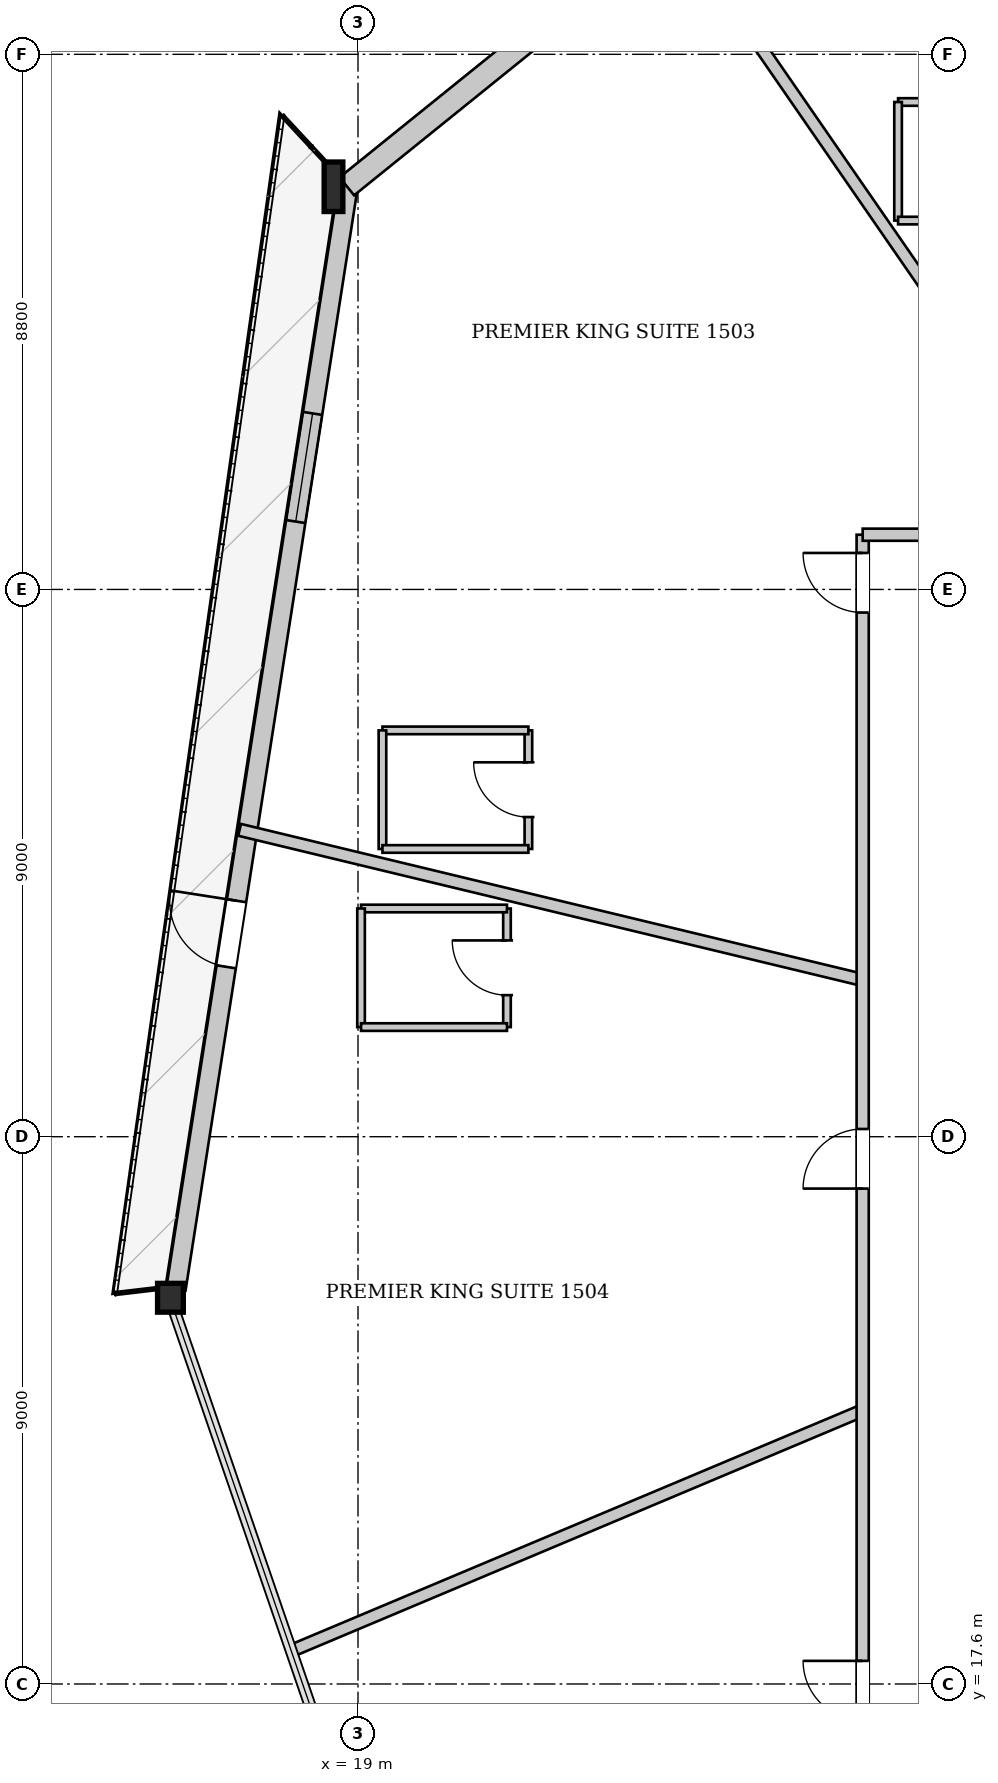
"""IFC4 building model, lengths in metres.
Left out: names, types, materials, properties, quantities, classifications, styles, units other than length and angle.
Written with IfcOpenShell. Run it as: python <this file> out.ifc"""

import sys

from ifc_helpers import new_model, si_unit, direction, frame, frame_2d, origin, origin_2d, place, context, subcontext, project, spatial, rectangle, i_section, extrude, source, transform, mapped, element, fill, save


model = new_model("IFC4")
c1 = context("Model", 3, precision=1e-05, world=origin(), true_north=direction((0.0, 1.0)))
c2 = subcontext(c1, "Body", "Model", "MODEL_VIEW")
j1 = project(units=[si_unit("LENGTHUNIT", "METRE"), si_unit("PLANEANGLEUNIT", "RADIAN")], contexts=[c1])
p1 = place(None, origin())
s1 = spatial("IfcSite", under=j1, at=p1, CompositionType="ELEMENT")
p2 = place(p1, origin())
s2 = spatial("IfcBuilding", under=s1, at=p2, CompositionType="ELEMENT")
p3 = place(p2, frame((0.0, 0.0, 61.25)))
s3 = spatial("IfcBuildingStorey", under=s2, at=p3, CompositionType="ELEMENT", Elevation=61.25)
m1 = source(origin(), c2, "Body", "SweptSolid", [
    extrude(i_section(OverallWidth=0.308, OverallDepth=0.814, WebThickness=0.021, FlangeThickness=0.04, at=origin_2d()), origin(), (0.0, 0.0, 1.0), 3.405),
])
p4 = place(p3, frame((18.697, 42.377, 0.0), z_axis=(-0.058937346962, -0.090843818249, 0.994119605389), x_axis=(0.838912262551, -0.544266677045, 0.0)))
e1 = element("IfcColumn", 1, at=p4, inside=s3, PredefinedType="COLUMN", context=c2, shape_type="MappedRepresentation", body=[
    mapped(m1, transform((0.0, 0.0, 0.0), x_axis=(1.0, 0.0, 0.0), y_axis=(0.0, 1.0, 0.0), z_axis=(0.0, 0.0, 1.0), scale=1.0)),
])
m2 = source(origin(), c2, "Body", "SweptSolid", [
    extrude(i_section(OverallWidth=0.424, OverallDepth=0.474, WebThickness=0.043, FlangeThickness=0.068, at=origin_2d()), origin(), (0.0, 0.0, 1.0), 3.404),
])
p5 = place(p3, frame((15.847, 24.12, 0.0), z_axis=(0.039800759955, -0.0988923387, 0.994301868073), x_axis=(0.92768588672, 0.373361615033, 0.0)))
e2 = element("IfcColumn", 2, at=p5, inside=s3, PredefinedType="COLUMN", context=c2, shape_type="MappedRepresentation", body=[
    mapped(m2, transform((0.0, 0.0, 0.0), x_axis=(1.0, 0.0, 0.0), y_axis=(0.0, 1.0, 0.0), z_axis=(0.0, 0.0, 1.0), scale=1.0)),
])
p6 = place(p3, frame((16.006, 24.095, 0.0), z_axis=(0.0, 0.0, 1.0), x_axis=(0.154230167558, 0.988034946454, 0.0)))
e3 = element("IfcWall", 3, at=p6, inside=s3, PredefinedType="SOLIDWALL", context=c2, shape_type="SweptSolid", body=[
    extrude(rectangle(XDim=18.478, YDim=0.32, at=frame_2d((9.239, 0.0))), origin(), (0.0, 0.0, 1.0), 2.592),
])
p7 = place(p6, frame((5.363, 0.0, 0.0)))
e4 = element("IfcOpeningElement", 4, at=p7, cuts=e3, PredefinedType="OPENING", context=c2, shape_type="SweptSolid", body=[
    extrude(rectangle(XDim=1.1, YDim=2.3, at=frame_2d((0.55, 1.15))), frame((0.0, 0.17, 0.0), z_axis=(0.0, -1.0, 0.0), x_axis=(1.0, 0.0, 0.0)), (0.0, 0.0, 1.0), 0.34),
])
p8 = place(p6, frame((12.774, 0.0, 0.272)))
e5 = element("IfcOpeningElement", 5, at=p8, cuts=e3, PredefinedType="OPENING", context=c2, shape_type="SweptSolid", body=[
    extrude(rectangle(XDim=1.8, YDim=2.2, at=frame_2d((0.9, 1.1))), frame((0.0, 0.17, 0.0), z_axis=(0.0, -1.0, 0.0), x_axis=(1.0, 0.0, 0.0)), (0.0, 0.0, 1.0), 0.34),
])
p9 = place(p3, frame((18.817, 42.229, 0.0), z_axis=(0.0, 0.0, 1.0), x_axis=(0.778217687349, 0.627994610722, 0.0)))
e6 = element("IfcWall", 6, at=p9, inside=s3, PredefinedType="SOLIDWALL", context=c2, shape_type="SweptSolid", body=[
    extrude(rectangle(XDim=6.207, YDim=0.38, at=frame_2d((3.103, 0.0))), origin(), (0.0, 0.0, 1.0), 2.592),
])
p10 = place(p3, frame((31.161, 36.5, 0.0), z_axis=(0.0, 0.0, 1.0), x_axis=(-0.568362835672, 0.822778030229, 0.0)))
e7 = element("IfcWall", 7, at=p10, inside=s3, PredefinedType="PARTITIONING", context=c2, shape_type="SweptSolid", body=[
    extrude(rectangle(XDim=11.708, YDim=0.2, at=frame_2d((5.854, 0.0))), origin(), (0.0, 0.0, 1.0), 3.3),
])
p11 = place(p3, frame((27.3, 29.178, 0.0), z_axis=(0.0, 0.0, 1.0), x_axis=(-0.972184679764, 0.234215602453, 0.0)))
e8 = element("IfcWall", 8, at=p11, inside=s3, PredefinedType="PARTITIONING", context=c2, shape_type="SweptSolid", body=[
    extrude(rectangle(XDim=10.541, YDim=0.2, at=frame_2d((5.27, 0.0))), origin(), (0.0, 0.0, 1.0), 3.3),
])
p12 = place(p3, frame((27.3, 22.098, 0.0), z_axis=(0.0, 0.0, 1.0), x_axis=(-0.921738414134, -0.387812191543, 0.0)))
e9 = element("IfcWall", 9, at=p12, inside=s3, PredefinedType="PARTITIONING", context=c2, shape_type="SweptSolid", body=[
    extrude(rectangle(XDim=10.166, YDim=0.2, at=frame_2d((5.083, 0.0))), origin(), (0.0, 0.0, 1.0), 3.3),
])
p13 = place(p3, frame((30.282, 43.616, 0.0), z_axis=(0.0, 0.0, 1.0), x_axis=(-1.0, 0.0, 0.0)))
e10 = element("IfcWall", 10, at=p13, inside=s3, PredefinedType="PARTITIONING", context=c2, shape_type="SweptSolid", body=[
    extrude(rectangle(XDim=2.4, YDim=0.125, at=frame_2d((1.2, 0.0))), origin(), (0.0, 0.0, 1.0), 3.3),
])
p14 = place(p3, frame((27.882, 43.616, 0.0), z_axis=(0.0, 0.0, 1.0), x_axis=(0.0, -1.0, 0.0)))
e11 = element("IfcWall", 11, at=p14, inside=s3, PredefinedType="PARTITIONING", context=c2, shape_type="SweptSolid", body=[
    extrude(rectangle(XDim=1.95, YDim=0.125, at=frame_2d((0.975, 0.0))), origin(), (0.0, 0.0, 1.0), 3.3),
])
p15 = place(p3, frame((27.882, 41.666, 0.0), z_axis=(0.0, 0.0, 1.0), x_axis=(1.0, 0.0, 0.0)))
e12 = element("IfcWall", 12, at=p15, inside=s3, PredefinedType="PARTITIONING", context=c2, shape_type="SweptSolid", body=[
    extrude(rectangle(XDim=2.4, YDim=0.125, at=frame_2d((1.2, 0.0))), origin(), (0.0, 0.0, 1.0), 3.3),
])
p16 = place(p3, frame((21.802, 31.332, 0.0), z_axis=(0.0, 0.0, 1.0), x_axis=(0.0, 1.0, 0.0)))
e13 = element("IfcWall", 13, at=p16, inside=s3, PredefinedType="PARTITIONING", context=c2, shape_type="SweptSolid", body=[
    extrude(rectangle(XDim=1.95, YDim=0.125, at=frame_2d((0.975, 0.0))), origin(), (0.0, 0.0, 1.0), 3.3),
])
p17 = place(p16, frame((0.525, 0.0, 0.0)))
e14 = element("IfcOpeningElement", 14, at=p17, cuts=e13, PredefinedType="OPENING", context=c2, shape_type="SweptSolid", body=[
    extrude(rectangle(XDim=0.9, YDim=2.1, at=frame_2d((0.45, 1.05))), frame((0.0, 0.073, 0.0), z_axis=(0.0, -1.0, 0.0), x_axis=(1.0, 0.0, 0.0)), (0.0, 0.0, 1.0), 0.145),
])
p18 = place(p3, frame((21.802, 33.282, 0.0), z_axis=(0.0, 0.0, 1.0), x_axis=(-1.0, 0.0, 0.0)))
e15 = element("IfcWall", 15, at=p18, inside=s3, PredefinedType="PARTITIONING", context=c2, shape_type="SweptSolid", body=[
    extrude(rectangle(XDim=2.4, YDim=0.125, at=frame_2d((1.2, 0.0))), origin(), (0.0, 0.0, 1.0), 3.3),
])
p19 = place(p3, frame((19.402, 33.282, 0.0), z_axis=(0.0, 0.0, 1.0), x_axis=(0.0, -1.0, 0.0)))
e16 = element("IfcWall", 16, at=p19, inside=s3, PredefinedType="PARTITIONING", context=c2, shape_type="SweptSolid", body=[
    extrude(rectangle(XDim=1.95, YDim=0.125, at=frame_2d((0.975, 0.0))), origin(), (0.0, 0.0, 1.0), 3.3),
])
p20 = place(p3, frame((19.402, 31.332, 0.0), z_axis=(0.0, 0.0, 1.0), x_axis=(1.0, 0.0, 0.0)))
e17 = element("IfcWall", 17, at=p20, inside=s3, PredefinedType="PARTITIONING", context=c2, shape_type="SweptSolid", body=[
    extrude(rectangle(XDim=2.4, YDim=0.125, at=frame_2d((1.2, 0.0))), origin(), (0.0, 0.0, 1.0), 3.3),
])
p21 = place(p3, frame((21.45, 28.403, 0.0), z_axis=(0.0, 0.0, 1.0), x_axis=(0.0, 1.0, 0.0)))
e18 = element("IfcWall", 18, at=p21, inside=s3, PredefinedType="PARTITIONING", context=c2, shape_type="SweptSolid", body=[
    extrude(rectangle(XDim=1.95, YDim=0.125, at=frame_2d((0.975, 0.0))), origin(), (0.0, 0.0, 1.0), 3.3),
])
p22 = place(p21, frame((0.525, 0.0, 0.0)))
e19 = element("IfcOpeningElement", 19, at=p22, cuts=e18, PredefinedType="OPENING", context=c2, shape_type="SweptSolid", body=[
    extrude(rectangle(XDim=0.9, YDim=2.1, at=frame_2d((0.45, 1.05))), frame((0.0, 0.073, 0.0), z_axis=(0.0, -1.0, 0.0), x_axis=(1.0, 0.0, 0.0)), (0.0, 0.0, 1.0), 0.145),
])
p23 = place(p3, frame((21.45, 30.353, 0.0), z_axis=(0.0, 0.0, 1.0), x_axis=(-1.0, 0.0, 0.0)))
e20 = element("IfcWall", 20, at=p23, inside=s3, PredefinedType="PARTITIONING", context=c2, shape_type="SweptSolid", body=[
    extrude(rectangle(XDim=2.4, YDim=0.125, at=frame_2d((1.2, 0.0))), origin(), (0.0, 0.0, 1.0), 3.3),
])
p24 = place(p3, frame((19.05, 30.353, 0.0), z_axis=(0.0, 0.0, 1.0), x_axis=(0.0, -1.0, 0.0)))
e21 = element("IfcWall", 21, at=p24, inside=s3, PredefinedType="PARTITIONING", context=c2, shape_type="SweptSolid", body=[
    extrude(rectangle(XDim=1.95, YDim=0.125, at=frame_2d((0.975, 0.0))), origin(), (0.0, 0.0, 1.0), 3.3),
])
p25 = place(p3, frame((19.05, 28.403, 0.0), z_axis=(0.0, 0.0, 1.0), x_axis=(1.0, 0.0, 0.0)))
e22 = element("IfcWall", 22, at=p25, inside=s3, PredefinedType="PARTITIONING", context=c2, shape_type="SweptSolid", body=[
    extrude(rectangle(XDim=2.4, YDim=0.125, at=frame_2d((1.2, 0.0))), origin(), (0.0, 0.0, 1.0), 3.3),
])
p26 = place(p3, frame((27.3, 16.7, 0.0), z_axis=(0.0, 0.0, 1.0), x_axis=(0.0, 1.0, 0.0)))
e23 = element("IfcWall", 23, at=p26, inside=s3, PredefinedType="PARTITIONING", context=c2, shape_type="SweptSolid", body=[
    extrude(rectangle(XDim=19.8, YDim=0.2, at=frame_2d((9.9, 0.0))), origin(), (0.0, 0.0, 1.0), 3.3),
])
p27 = place(p26, frame((18.52, 0.0, 0.0)))
e24 = element("IfcOpeningElement", 24, at=p27, cuts=e23, PredefinedType="OPENING", context=c2, shape_type="SweptSolid", body=[
    extrude(rectangle(XDim=0.98, YDim=2.15, at=frame_2d((0.49, 1.075))), frame((0.0, 0.11, 0.0), z_axis=(0.0, -1.0, 0.0), x_axis=(1.0, 0.0, 0.0)), (0.0, 0.0, 1.0), 0.22),
])
p28 = place(p26, frame((9.047, 0.0, 0.0)))
e25 = element("IfcOpeningElement", 25, at=p28, cuts=e23, PredefinedType="OPENING", context=c2, shape_type="SweptSolid", body=[
    extrude(rectangle(XDim=0.98, YDim=2.15, at=frame_2d((0.49, 1.075))), frame((0.0, 0.11, 0.0), z_axis=(0.0, -1.0, 0.0), x_axis=(1.0, 0.0, 0.0)), (0.0, 0.0, 1.0), 0.22),
])
p29 = place(p26, frame((0.3, 0.0, 0.0)))
e26 = element("IfcOpeningElement", 26, at=p29, cuts=e23, PredefinedType="OPENING", context=c2, shape_type="SweptSolid", body=[
    extrude(rectangle(XDim=0.98, YDim=2.15, at=frame_2d((0.49, 1.075))), frame((0.0, 0.11, 0.0), z_axis=(0.0, -1.0, 0.0), x_axis=(1.0, 0.0, 0.0)), (0.0, 0.0, 1.0), 0.22),
])
p30 = place(p3, frame((27.3, 36.5, 0.0), z_axis=(0.0, 0.0, 1.0), x_axis=(1.0, 0.0, 0.0)))
e27 = element("IfcWall", 27, at=p30, inside=s3, PredefinedType="PARTITIONING", context=c2, shape_type="SweptSolid", body=[
    extrude(rectangle(XDim=21.4, YDim=0.2, at=frame_2d((10.7, 0.0))), origin(), (0.0, 0.0, 1.0), 3.3),
])
p31 = place(p30, frame((19.414, 0.0, 0.0)))
e28 = element("IfcOpeningElement", 28, at=p31, cuts=e27, PredefinedType="OPENING", context=c2, shape_type="SweptSolid", body=[
    extrude(rectangle(XDim=0.98, YDim=2.15, at=frame_2d((0.49, 1.075))), frame((0.0, 0.11, 0.0), z_axis=(0.0, -1.0, 0.0), x_axis=(1.0, 0.0, 0.0)), (0.0, 0.0, 1.0), 0.22),
])
p32 = place(p30, frame((6.682, 0.0, 0.0)))
e29 = element("IfcOpeningElement", 29, at=p32, cuts=e27, PredefinedType="OPENING", context=c2, shape_type="SweptSolid", body=[
    extrude(rectangle(XDim=0.98, YDim=2.15, at=frame_2d((0.49, 1.075))), frame((0.0, 0.11, 0.0), z_axis=(0.0, -1.0, 0.0), x_axis=(1.0, 0.0, 0.0)), (0.0, 0.0, 1.0), 0.22),
])
m3 = source(origin(), c2, "Body", "SweptSolid", [
    extrude(rectangle(XDim=1.1, YDim=2.3, at=frame_2d((0.55, 1.15))), frame((0.0, 0.025, 0.0), z_axis=(0.0, -1.0, 0.0), x_axis=(1.0, 0.0, 0.0)), (0.0, 0.0, 1.0), 0.05),
])
p33 = place(p7, origin())
e30 = element("IfcDoor", 30, at=p33, inside=s3, OperationType="SINGLE_SWING_RIGHT", PredefinedType="DOOR", context=c2, shape_type="MappedRepresentation", body=[
    mapped(m3, transform((0.0, 0.0, 0.0), x_axis=(1.0, 0.0, 0.0), y_axis=(0.0, 1.0, 0.0), z_axis=(0.0, 0.0, 1.0), scale=1.0)),
])
fill(e4, e30)
m4 = source(origin(), c2, "Body", "SweptSolid", [
    extrude(rectangle(XDim=1.8, YDim=2.2, at=frame_2d((0.9, 1.1))), frame((0.0, 0.03, 0.0), z_axis=(0.0, -1.0, 0.0), x_axis=(1.0, 0.0, 0.0)), (0.0, 0.0, 1.0), 0.06),
])
p34 = place(p8, origin())
e31 = element("IfcWindow", 31, at=p34, inside=s3, PartitioningType="SINGLE_PANEL", PredefinedType="WINDOW", context=c2, shape_type="MappedRepresentation", body=[
    mapped(m4, transform((0.0, 0.0, 0.0), x_axis=(1.0, 0.0, 0.0), y_axis=(0.0, 1.0, 0.0), z_axis=(0.0, 0.0, 1.0), scale=1.0)),
])
fill(e5, e31)
m5 = source(origin(), c2, "Body", "SweptSolid", [
    extrude(rectangle(XDim=0.9, YDim=2.1, at=frame_2d((0.45, 1.05))), frame((0.0, 0.025, 0.0), z_axis=(0.0, -1.0, 0.0), x_axis=(1.0, 0.0, 0.0)), (0.0, 0.0, 1.0), 0.05),
])
p35 = place(p17, origin())
e32 = element("IfcDoor", 32, at=p35, inside=s3, OperationType="SINGLE_SWING_RIGHT", PredefinedType="DOOR", context=c2, shape_type="MappedRepresentation", body=[
    mapped(m5, transform((0.0, 0.0, 0.0), x_axis=(1.0, 0.0, 0.0), y_axis=(0.0, 1.0, 0.0), z_axis=(0.0, 0.0, 1.0), scale=1.0)),
])
fill(e14, e32)
p36 = place(p22, origin())
e33 = element("IfcDoor", 33, at=p36, inside=s3, OperationType="SINGLE_SWING_RIGHT", PredefinedType="DOOR", context=c2, shape_type="MappedRepresentation", body=[
    mapped(m5, transform((0.0, 0.0, 0.0), x_axis=(1.0, 0.0, 0.0), y_axis=(0.0, 1.0, 0.0), z_axis=(0.0, 0.0, 1.0), scale=1.0)),
])
fill(e19, e33)
m6 = source(origin(), c2, "Body", "SweptSolid", [
    extrude(rectangle(XDim=0.98, YDim=2.15, at=frame_2d((0.49, 1.075))), frame((0.0, 0.025, 0.0), z_axis=(0.0, -1.0, 0.0), x_axis=(1.0, 0.0, 0.0)), (0.0, 0.0, 1.0), 0.05),
])
p37 = place(p27, origin())
e34 = element("IfcDoor", 34, at=p37, inside=s3, OperationType="SINGLE_SWING_RIGHT", PredefinedType="DOOR", context=c2, shape_type="MappedRepresentation", body=[
    mapped(m6, transform((0.0, 0.0, 0.0), x_axis=(1.0, 0.0, 0.0), y_axis=(0.0, 1.0, 0.0), z_axis=(0.0, 0.0, 1.0), scale=1.0)),
])
fill(e24, e34)
p38 = place(p28, origin())
e35 = element("IfcDoor", 35, at=p38, inside=s3, OperationType="SINGLE_SWING_LEFT", PredefinedType="DOOR", context=c2, shape_type="MappedRepresentation", body=[
    mapped(m6, transform((0.0, 0.0, 0.0), x_axis=(1.0, 0.0, 0.0), y_axis=(0.0, 1.0, 0.0), z_axis=(0.0, 0.0, 1.0), scale=1.0)),
])
fill(e25, e35)
p39 = place(p29, origin())
e36 = element("IfcDoor", 36, at=p39, inside=s3, OperationType="SINGLE_SWING_RIGHT", PredefinedType="DOOR", context=c2, shape_type="MappedRepresentation", body=[
    mapped(m6, transform((0.0, 0.0, 0.0), x_axis=(1.0, 0.0, 0.0), y_axis=(0.0, 1.0, 0.0), z_axis=(0.0, 0.0, 1.0), scale=1.0)),
])
fill(e26, e36)
save(model, sys.argv[1])
